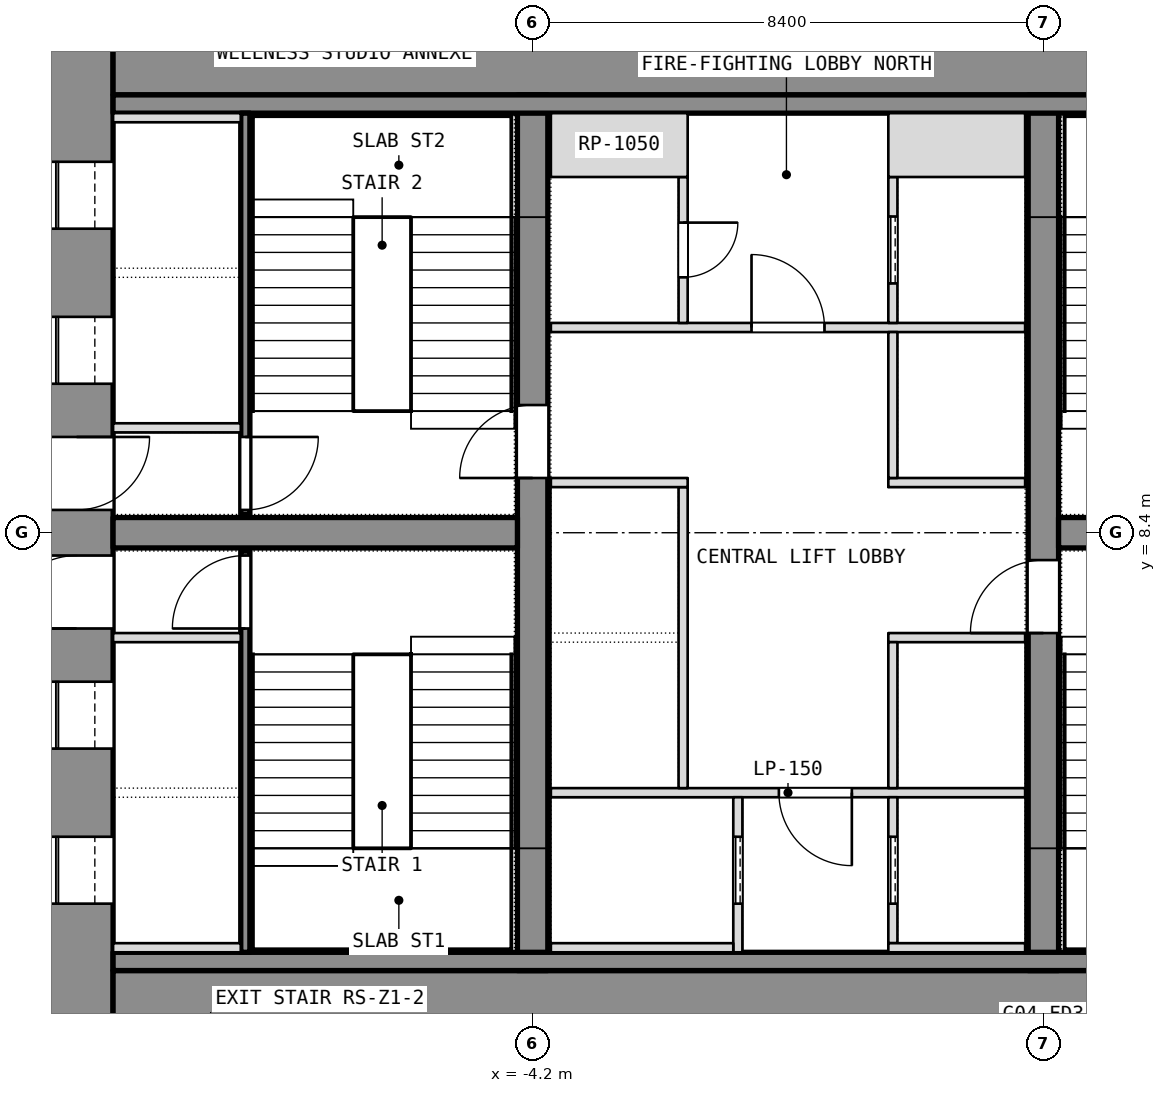
"""IFC4 building model, lengths in metres.
Left out: names, types, materials, properties, quantities, classifications, styles, units other than length and angle.
Written with IfcOpenShell. Run it as: python <this file> out.ifc"""

import sys

from ifc_helpers import new_model, si_unit, direction, frame, frame_2d, origin, place, context, subcontext, project, spatial, rectangle, extrude, element, fill, save


model = new_model("IFC4")
c1 = context("Model", 3, precision=1e-05, world=origin(), true_north=direction((0.0, 1.0)))
c2 = subcontext(c1, "Body", "Model", "MODEL_VIEW")
j1 = project(units=[si_unit("LENGTHUNIT", "METRE"), si_unit("PLANEANGLEUNIT", "RADIAN")], contexts=[c1])
p1 = place(None, origin())
s1 = spatial("IfcSite", under=j1, at=p1, CompositionType="ELEMENT")
p2 = place(p1, origin())
s2 = spatial("IfcBuilding", under=s1, at=p2, CompositionType="ELEMENT")
p3 = place(p2, frame((0.0, 0.0, 61.7)))
s3 = spatial("IfcBuildingStorey", under=s2, at=p3, CompositionType="ELEMENT", Elevation=61.7)
p4 = place(p3, frame((-11.7, 0.0, 0.0), z_axis=(0.0, 0.0, 1.0), x_axis=(0.0, 1.0, 0.0)))
e1 = element("IfcWall", 1, at=p4, inside=s3, PredefinedType="SHEAR", context=c2, shape_type="SweptSolid", body=[
    extrude(rectangle(XDim=16.8, YDim=1.2, at=frame_2d((8.4, 0.0))), origin(), (0.0, 0.0, 1.0), 3.6),
])
p5 = place(p4, frame((2.3, 0.0, 0.0)))
e2 = element("IfcOpeningElement", 2, at=p5, cuts=e1, PredefinedType="OPENING", context=c2, shape_type="SweptSolid", body=[
    extrude(rectangle(XDim=1.1, YDim=2.1, at=frame_2d((0.55, 1.05))), frame((0.0, 0.6, 0.0), z_axis=(0.0, -1.0, 0.0), x_axis=(1.0, 0.0, 0.0)), (0.0, 0.0, 1.0), 1.2),
])
p6 = place(p4, frame((4.85, 0.0, 0.0)))
e3 = element("IfcOpeningElement", 3, at=p6, cuts=e1, PredefinedType="OPENING", context=c2, shape_type="SweptSolid", body=[
    extrude(rectangle(XDim=1.1, YDim=2.1, at=frame_2d((0.55, 1.05))), frame((0.0, 0.6, 0.0), z_axis=(0.0, -1.0, 0.0), x_axis=(1.0, 0.0, 0.0)), (0.0, 0.0, 1.0), 1.2),
])
p7 = place(p4, frame((6.825, 0.0, 0.0)))
e4 = element("IfcOpeningElement", 4, at=p7, cuts=e1, PredefinedType="OPENING", context=c2, shape_type="SweptSolid", body=[
    extrude(rectangle(XDim=1.2, YDim=2.1, at=frame_2d((0.6, 1.05))), frame((0.0, 0.6, 0.0), z_axis=(0.0, -1.0, 0.0), x_axis=(1.0, 0.0, 0.0)), (0.0, 0.0, 1.0), 1.2),
])
p8 = place(p4, frame((13.4, 0.0, 0.0)))
e5 = element("IfcOpeningElement", 5, at=p8, cuts=e1, PredefinedType="OPENING", context=c2, shape_type="SweptSolid", body=[
    extrude(rectangle(XDim=1.1, YDim=2.1, at=frame_2d((0.55, 1.05))), frame((0.0, 0.6, 0.0), z_axis=(0.0, -1.0, 0.0), x_axis=(1.0, 0.0, 0.0)), (0.0, 0.0, 1.0), 1.2),
])
p9 = place(p4, frame((10.85, 0.0, 0.0)))
e6 = element("IfcOpeningElement", 6, at=p9, cuts=e1, PredefinedType="OPENING", context=c2, shape_type="SweptSolid", body=[
    extrude(rectangle(XDim=1.1, YDim=2.1, at=frame_2d((0.55, 1.05))), frame((0.0, 0.6, 0.0), z_axis=(0.0, -1.0, 0.0), x_axis=(1.0, 0.0, 0.0)), (0.0, 0.0, 1.0), 1.2),
])
p10 = place(p4, frame((8.775, 0.0, 0.0)))
e7 = element("IfcOpeningElement", 7, at=p10, cuts=e1, PredefinedType="OPENING", context=c2, shape_type="SweptSolid", body=[
    extrude(rectangle(XDim=1.2, YDim=2.1, at=frame_2d((0.6, 1.05))), frame((0.0, 0.6, 0.0), z_axis=(0.0, -1.0, 0.0), x_axis=(1.0, 0.0, 0.0)), (0.0, 0.0, 1.0), 1.2),
])
for number, where, z_axis, x_axis in (
    (8, (-11.1, 0.6, 0.0), (0.0, 0.0, 1.0), (1.0, 0.0, 0.0)),
    (9, (-11.1, 16.2, 0.0), (0.0, 0.0, 1.0), (1.0, 0.0, 0.0)),
):
    element("IfcWall", number, at=place(p3, frame(where, z_axis=z_axis, x_axis=x_axis)), inside=s3, PredefinedType="SHEAR", context=c2, shape_type="SweptSolid", body=[
        extrude(rectangle(XDim=22.2, YDim=1.2, at=frame_2d((11.1, 0.0))), origin(), (0.0, 0.0, 1.0), 3.6),
    ])
p11 = place(p3, frame((-4.2, 1.2, 0.0), z_axis=(0.0, 0.0, 1.0), x_axis=(0.0, 1.0, 0.0)))
e10 = element("IfcWall", 10, at=p11, inside=s3, PredefinedType="SHEAR", context=c2, shape_type="SweptSolid", body=[
    extrude(rectangle(XDim=14.4, YDim=0.5, at=frame_2d((7.2, 0.0))), origin(), (0.0, 0.0, 1.0), 3.6),
])
p12 = place(p11, frame((8.1, 0.0, 0.0)))
e11 = element("IfcOpeningElement", 11, at=p12, cuts=e10, PredefinedType="OPENING", context=c2, shape_type="SweptSolid", body=[
    extrude(rectangle(XDim=1.2, YDim=2.1, at=frame_2d((0.6, 1.05))), frame((0.0, 0.25, 0.0), z_axis=(0.0, -1.0, 0.0), x_axis=(1.0, 0.0, 0.0)), (0.0, 0.0, 1.0), 0.5),
])
p13 = place(p3, frame((4.2, 1.2, 0.0), z_axis=(0.0, 0.0, 1.0), x_axis=(0.0, 1.0, 0.0)))
e12 = element("IfcWall", 12, at=p13, inside=s3, PredefinedType="SHEAR", context=c2, shape_type="SweptSolid", body=[
    extrude(rectangle(XDim=14.4, YDim=0.5, at=frame_2d((7.2, 0.0))), origin(), (0.0, 0.0, 1.0), 3.6),
])
p14 = place(p13, frame((5.55, 0.0, 0.0)))
e13 = element("IfcOpeningElement", 13, at=p14, cuts=e12, PredefinedType="OPENING", context=c2, shape_type="SweptSolid", body=[
    extrude(rectangle(XDim=1.2, YDim=2.1, at=frame_2d((0.6, 1.05))), frame((0.0, 0.25, 0.0), z_axis=(0.0, -1.0, 0.0), x_axis=(1.0, 0.0, 0.0)), (0.0, 0.0, 1.0), 0.5),
])
for number, where, z_axis, x_axis in (
    (14, (-11.1, 8.4, 0.0), (0.0, 0.0, 1.0), (1.0, 0.0, 0.0)),
    (15, (4.45, 8.4, 0.0), (0.0, 0.0, 1.0), (1.0, 0.0, 0.0)),
):
    element("IfcWall", number, at=place(p3, frame(where, z_axis=z_axis, x_axis=x_axis)), inside=s3, PredefinedType="SHEAR", context=c2, shape_type="SweptSolid", body=[
        extrude(rectangle(XDim=6.65, YDim=0.5, at=frame_2d((3.325, 0.0))), origin(), (0.0, 0.0, 1.0), 3.6),
    ])
for number, where, z_axis, x_axis in (
    (16, (-11.1, 1.35, 0.0), (0.0, 0.0, 1.0), (1.0, 0.0, 0.0)),
    (17, (-11.1, 15.45, 0.0), (0.0, 0.0, 1.0), (1.0, 0.0, 0.0)),
):
    element("IfcWall", number, at=place(p3, frame(where, z_axis=z_axis, x_axis=x_axis)), inside=s3, PredefinedType="PARTITIONING", context=c2, shape_type="SweptSolid", body=[
        extrude(rectangle(XDim=22.2, YDim=0.3, at=frame_2d((11.1, 0.0))), origin(), (0.0, 0.0, 1.0), 3.34),
    ])
p15 = place(p3, frame((-8.925, 1.5, 0.0), z_axis=(0.0, 0.0, 1.0), x_axis=(0.0, 1.0, 0.0)))
e18 = element("IfcWall", 18, at=p15, inside=s3, PredefinedType="SHEAR", context=c2, shape_type="SweptSolid", body=[
    extrude(rectangle(XDim=6.6, YDim=0.15, at=frame_2d((3.3, 0.0))), origin(), (0.0, 0.0, 1.0), 3.34),
])
p16 = place(p15, frame((5.325, 0.0, 0.0)))
e19 = element("IfcOpeningElement", 19, at=p16, cuts=e18, PredefinedType="OPENING", context=c2, shape_type="SweptSolid", body=[
    extrude(rectangle(XDim=1.2, YDim=2.1, at=frame_2d((0.6, 1.05))), frame((0.0, 0.075, 0.0), z_axis=(0.0, -1.0, 0.0), x_axis=(1.0, 0.0, 0.0)), (0.0, 0.0, 1.0), 0.15),
])
for number, where, z_axis, x_axis in (
    (20, (-11.1, 6.675, 0.0), (0.0, 0.0, 1.0), (1.0, 0.0, 0.0)),
    (21, (-11.1, 1.575, 0.0), (0.0, 0.0, 1.0), (1.0, 0.0, 0.0)),
):
    element("IfcWall", number, at=place(p3, frame(where, z_axis=z_axis, x_axis=x_axis)), inside=s3, PredefinedType="SHEAR", context=c2, shape_type="SweptSolid", body=[
        extrude(rectangle(XDim=2.1, YDim=0.15, at=frame_2d((1.05, 0.0))), origin(), (0.0, 0.0, 1.0), 3.6),
    ])
p17 = place(p3, frame((-8.925, 8.7, 0.0), z_axis=(0.0, 0.0, 1.0), x_axis=(0.0, 1.0, 0.0)))
e22 = element("IfcWall", 22, at=p17, inside=s3, PredefinedType="SHEAR", context=c2, shape_type="SweptSolid", body=[
    extrude(rectangle(XDim=6.6, YDim=0.15, at=frame_2d((3.3, 0.0))), origin(), (0.0, 0.0, 1.0), 3.34),
])
p18 = place(p17, frame((0.075, 0.0, 0.0)))
e23 = element("IfcOpeningElement", 23, at=p18, cuts=e22, PredefinedType="OPENING", context=c2, shape_type="SweptSolid", body=[
    extrude(rectangle(XDim=1.2, YDim=2.1, at=frame_2d((0.6, 1.05))), frame((0.0, 0.075, 0.0), z_axis=(0.0, -1.0, 0.0), x_axis=(1.0, 0.0, 0.0)), (0.0, 0.0, 1.0), 0.15),
])
for number, where, z_axis, x_axis in (
    (24, (-11.1, 10.125, 0.0), (0.0, 0.0, 1.0), (1.0, 0.0, 0.0)),
    (25, (-11.1, 15.225, 0.0), (0.0, 0.0, 1.0), (1.0, 0.0, 0.0)),
):
    element("IfcWall", number, at=place(p3, frame(where, z_axis=z_axis, x_axis=x_axis)), inside=s3, PredefinedType="SHEAR", context=c2, shape_type="SweptSolid", body=[
        extrude(rectangle(XDim=2.1, YDim=0.15, at=frame_2d((1.05, 0.0))), origin(), (0.0, 0.0, 1.0), 3.6),
    ])
p19 = place(p3, frame((-3.9, 4.125, 0.0), z_axis=(0.0, 0.0, 1.0), x_axis=(1.0, 0.0, 0.0)))
e26 = element("IfcWall", 26, at=p19, inside=s3, PredefinedType="PARTITIONING", context=c2, shape_type="SweptSolid", body=[
    extrude(rectangle(XDim=7.8, YDim=0.15, at=frame_2d((3.9, 0.0))), origin(), (0.0, 0.0, 1.0), 3.34),
])
p20 = place(p19, frame((3.75, 0.0, 0.0)))
e27 = element("IfcOpeningElement", 27, at=p20, cuts=e26, PredefinedType="OPENING", context=c2, shape_type="SweptSolid", body=[
    extrude(rectangle(XDim=1.2, YDim=2.1, at=frame_2d((0.6, 1.05))), frame((0.0, 0.075, 0.0), z_axis=(0.0, -1.0, 0.0), x_axis=(1.0, 0.0, 0.0)), (0.0, 0.0, 1.0), 0.15),
])
p21 = place(p3, frame((-3.9, 11.775, 0.0), z_axis=(0.0, 0.0, 1.0), x_axis=(1.0, 0.0, 0.0)))
e28 = element("IfcWall", 28, at=p21, inside=s3, PredefinedType="PARTITIONING", context=c2, shape_type="SweptSolid", body=[
    extrude(rectangle(XDim=7.8, YDim=0.15, at=frame_2d((3.9, 0.0))), origin(), (0.0, 0.0, 1.0), 3.34),
])
p22 = place(p21, frame((3.3, 0.0, 0.0)))
e29 = element("IfcOpeningElement", 29, at=p22, cuts=e28, PredefinedType="OPENING", context=c2, shape_type="SweptSolid", body=[
    extrude(rectangle(XDim=1.2, YDim=2.1, at=frame_2d((0.6, 1.05))), frame((0.0, 0.075, 0.0), z_axis=(0.0, -1.0, 0.0), x_axis=(1.0, 0.0, 0.0)), (0.0, 0.0, 1.0), 0.15),
])
p23 = place(p3, frame((-0.825, 1.5, 0.0), z_axis=(0.0, 0.0, 1.0), x_axis=(0.0, 1.0, 0.0)))
e30 = element("IfcWall", 30, at=p23, inside=s3, PredefinedType="SHEAR", context=c2, shape_type="SweptSolid", body=[
    extrude(rectangle(XDim=2.55, YDim=0.15, at=frame_2d((1.275, 0.0))), origin(), (0.0, 0.0, 1.0), 3.6),
])
p24 = place(p23, frame((0.8, 0.0, 0.0)))
e31 = element("IfcOpeningElement", 31, at=p24, cuts=e30, PredefinedType="OPENING", context=c2, shape_type="SweptSolid", body=[
    extrude(rectangle(XDim=1.1, YDim=2.1, at=frame_2d((0.55, 1.05))), frame((0.0, 0.075, 0.0), z_axis=(0.0, -1.0, 0.0), x_axis=(1.0, 0.0, 0.0)), (0.0, 0.0, 1.0), 0.15),
])
p25 = place(p3, frame((-3.9, 1.575, 0.0), z_axis=(0.0, 0.0, 1.0), x_axis=(1.0, 0.0, 0.0)))
e32 = element("IfcWall", 32, at=p25, inside=s3, PredefinedType="SHEAR", context=c2, shape_type="SweptSolid", body=[
    extrude(rectangle(XDim=3.0, YDim=0.15, at=frame_2d((1.5, 0.0))), origin(), (0.0, 0.0, 1.0), 3.6),
])
p26 = place(p3, frame((-1.725, 4.2, 0.0), z_axis=(0.0, 0.0, 1.0), x_axis=(0.0, 1.0, 0.0)))
e33 = element("IfcWall", 33, at=p26, inside=s3, PredefinedType="SHEAR", context=c2, shape_type="SweptSolid", body=[
    extrude(rectangle(XDim=4.95, YDim=0.15, at=frame_2d((2.475, 0.0))), origin(), (0.0, 0.0, 1.0), 3.6),
])
p27 = place(p3, frame((-3.9, 9.225, 0.0), z_axis=(0.0, 0.0, 1.0), x_axis=(1.0, 0.0, 0.0)))
e34 = element("IfcWall", 34, at=p27, inside=s3, PredefinedType="SHEAR", context=c2, shape_type="SweptSolid", body=[
    extrude(rectangle(XDim=2.25, YDim=0.15, at=frame_2d((1.125, 0.0))), origin(), (0.0, 0.0, 1.0), 3.6),
])
p28 = place(p3, frame((-1.725, 11.85, 0.0), z_axis=(0.0, 0.0, 1.0), x_axis=(0.0, 1.0, 0.0)))
e35 = element("IfcWall", 35, at=p28, inside=s3, PredefinedType="PARTITIONING", context=c2, shape_type="SweptSolid", body=[
    extrude(rectangle(XDim=2.4, YDim=0.15, at=frame_2d((1.2, 0.0))), origin(), (0.0, 0.0, 1.0), 3.34),
])
p29 = place(p28, frame((0.75, 0.0, 0.0)))
e36 = element("IfcOpeningElement", 36, at=p29, cuts=e35, PredefinedType="OPENING", context=c2, shape_type="SweptSolid", body=[
    extrude(rectangle(XDim=0.9, YDim=2.1, at=frame_2d((0.45, 1.05))), frame((0.0, 0.075, 0.0), z_axis=(0.0, -1.0, 0.0), x_axis=(1.0, 0.0, 0.0)), (0.0, 0.0, 1.0), 0.15),
])
p30 = place(p3, frame((-3.9, 14.775, 0.0), z_axis=(0.0, 0.0, 1.0), x_axis=(1.0, 0.0, 0.0)))
e37 = element("IfcWall", 37, at=p30, inside=s3, PredefinedType="PARTITIONING", context=c2, shape_type="SweptSolid", body=[
    extrude(rectangle(XDim=2.25, YDim=1.05, at=frame_2d((1.125, 0.0))), origin(), (0.0, 0.0, 1.0), 3.34),
])
p31 = place(p3, frame((1.725, 1.65, 0.0), z_axis=(0.0, 0.0, 1.0), x_axis=(0.0, 1.0, 0.0)))
e38 = element("IfcWall", 38, at=p31, inside=s3, PredefinedType="SHEAR", context=c2, shape_type="SweptSolid", body=[
    extrude(rectangle(XDim=2.4, YDim=0.15, at=frame_2d((1.2, 0.0))), origin(), (0.0, 0.0, 1.0), 3.6),
])
p32 = place(p31, frame((0.65, 0.0, 0.0)))
e39 = element("IfcOpeningElement", 39, at=p32, cuts=e38, PredefinedType="OPENING", context=c2, shape_type="SweptSolid", body=[
    extrude(rectangle(XDim=1.1, YDim=2.1, at=frame_2d((0.55, 1.05))), frame((0.0, 0.075, 0.0), z_axis=(0.0, -1.0, 0.0), x_axis=(1.0, 0.0, 0.0)), (0.0, 0.0, 1.0), 0.15),
])
p33 = place(p3, frame((1.65, 1.575, 0.0), z_axis=(0.0, 0.0, 1.0), x_axis=(1.0, 0.0, 0.0)))
e40 = element("IfcWall", 40, at=p33, inside=s3, PredefinedType="SHEAR", context=c2, shape_type="SweptSolid", body=[
    extrude(rectangle(XDim=2.25, YDim=0.15, at=frame_2d((1.125, 0.0))), origin(), (0.0, 0.0, 1.0), 3.6),
])
p34 = place(p3, frame((1.725, 11.85, 0.0), z_axis=(0.0, 0.0, 1.0), x_axis=(0.0, 1.0, 0.0)))
e41 = element("IfcWall", 41, at=p34, inside=s3, PredefinedType="SHEAR", context=c2, shape_type="SweptSolid", body=[
    extrude(rectangle(XDim=2.4, YDim=0.15, at=frame_2d((1.2, 0.0))), origin(), (0.0, 0.0, 1.0), 3.6),
])
p35 = place(p34, frame((0.65, 0.0, 0.0)))
e42 = element("IfcOpeningElement", 42, at=p35, cuts=e41, PredefinedType="OPENING", context=c2, shape_type="SweptSolid", body=[
    extrude(rectangle(XDim=1.1, YDim=2.1, at=frame_2d((0.55, 1.05))), frame((0.0, 0.075, 0.0), z_axis=(0.0, -1.0, 0.0), x_axis=(1.0, 0.0, 0.0)), (0.0, 0.0, 1.0), 0.15),
])
p36 = place(p3, frame((1.65, 14.775, 0.0), z_axis=(0.0, 0.0, 1.0), x_axis=(1.0, 0.0, 0.0)))
e43 = element("IfcWall", 43, at=p36, inside=s3, PredefinedType="SHEAR", context=c2, shape_type="SweptSolid", body=[
    extrude(rectangle(XDim=2.25, YDim=1.05, at=frame_2d((1.125, 0.0))), origin(), (0.0, 0.0, 1.0), 3.6),
])
for number, where, z_axis, x_axis in (
    (44, (1.65, 6.675, 0.0), (0.0, 0.0, 1.0), (1.0, 0.0, 0.0)),
    (45, (1.65, 9.225, 0.0), (0.0, 0.0, 1.0), (1.0, 0.0, 0.0)),
):
    element("IfcWall", number, at=place(p3, frame(where, z_axis=z_axis, x_axis=x_axis)), inside=s3, PredefinedType="SHEAR", context=c2, shape_type="SweptSolid", body=[
        extrude(rectangle(XDim=2.25, YDim=0.15, at=frame_2d((1.125, 0.0))), origin(), (0.0, 0.0, 1.0), 3.6),
    ])
p37 = place(p3, frame((1.725, 4.2, 0.0), z_axis=(0.0, 0.0, 1.0), x_axis=(0.0, 1.0, 0.0)))
e46 = element("IfcWall", 46, at=p37, inside=s3, PredefinedType="SHEAR", context=c2, shape_type="SweptSolid", body=[
    extrude(rectangle(XDim=2.4, YDim=0.15, at=frame_2d((1.2, 0.0))), origin(), (0.0, 0.0, 1.0), 3.6),
])
p38 = place(p3, frame((1.725, 9.3, 0.0), z_axis=(0.0, 0.0, 1.0), x_axis=(0.0, 1.0, 0.0)))
e47 = element("IfcWall", 47, at=p38, inside=s3, PredefinedType="SHEAR", context=c2, shape_type="SweptSolid", body=[
    extrude(rectangle(XDim=2.4, YDim=0.15, at=frame_2d((1.2, 0.0))), origin(), (0.0, 0.0, 1.0), 3.6),
])
p39 = place(p5, origin())
e48 = element("IfcDoor", 48, at=p39, inside=s3, OperationType="SLIDING_TO_LEFT", PredefinedType="DOOR", context=c2, shape_type="SweptSolid", body=[
    extrude(rectangle(XDim=1.1, YDim=2.1, at=frame_2d((0.55, 1.05))), frame((0.0, 0.025, 0.0), z_axis=(0.0, -1.0, 0.0), x_axis=(1.0, 0.0, 0.0)), (0.0, 0.0, 1.0), 0.05),
])
fill(e2, e48)
p40 = place(p6, origin())
e49 = element("IfcDoor", 49, at=p40, inside=s3, OperationType="SLIDING_TO_LEFT", PredefinedType="DOOR", context=c2, shape_type="SweptSolid", body=[
    extrude(rectangle(XDim=1.1, YDim=2.1, at=frame_2d((0.55, 1.05))), frame((0.0, 0.025, 0.0), z_axis=(0.0, -1.0, 0.0), x_axis=(1.0, 0.0, 0.0)), (0.0, 0.0, 1.0), 0.05),
])
fill(e3, e49)
p41 = place(p7, origin())
e50 = element("IfcDoor", 50, at=p41, inside=s3, OperationType="SINGLE_SWING_LEFT", PredefinedType="DOOR", context=c2, shape_type="SweptSolid", body=[
    extrude(rectangle(XDim=1.2, YDim=2.1, at=frame_2d((0.6, 1.05))), frame((0.0, 0.025, 0.0), z_axis=(0.0, -1.0, 0.0), x_axis=(1.0, 0.0, 0.0)), (0.0, 0.0, 1.0), 0.05),
])
fill(e4, e50)
p42 = place(p16, origin())
e51 = element("IfcDoor", 51, at=p42, inside=s3, OperationType="SINGLE_SWING_LEFT", PredefinedType="DOOR", context=c2, shape_type="SweptSolid", body=[
    extrude(rectangle(XDim=1.2, YDim=2.1, at=frame_2d((0.6, 1.05))), frame((0.0, 0.025, 0.0), z_axis=(0.0, -1.0, 0.0), x_axis=(1.0, 0.0, 0.0)), (0.0, 0.0, 1.0), 0.05),
])
fill(e19, e51)
p43 = place(p8, origin())
e52 = element("IfcDoor", 52, at=p43, inside=s3, OperationType="SLIDING_TO_LEFT", PredefinedType="DOOR", context=c2, shape_type="SweptSolid", body=[
    extrude(rectangle(XDim=1.1, YDim=2.1, at=frame_2d((0.55, 1.05))), frame((0.0, 0.025, 0.0), z_axis=(0.0, -1.0, 0.0), x_axis=(1.0, 0.0, 0.0)), (0.0, 0.0, 1.0), 0.05),
])
fill(e5, e52)
p44 = place(p9, origin())
e53 = element("IfcDoor", 53, at=p44, inside=s3, OperationType="SLIDING_TO_LEFT", PredefinedType="DOOR", context=c2, shape_type="SweptSolid", body=[
    extrude(rectangle(XDim=1.1, YDim=2.1, at=frame_2d((0.55, 1.05))), frame((0.0, 0.025, 0.0), z_axis=(0.0, -1.0, 0.0), x_axis=(1.0, 0.0, 0.0)), (0.0, 0.0, 1.0), 0.05),
])
fill(e6, e53)
p45 = place(p10, origin())
e54 = element("IfcDoor", 54, at=p45, inside=s3, OperationType="SINGLE_SWING_LEFT", PredefinedType="DOOR", context=c2, shape_type="SweptSolid", body=[
    extrude(rectangle(XDim=1.2, YDim=2.1, at=frame_2d((0.6, 1.05))), frame((0.0, 0.025, 0.0), z_axis=(0.0, -1.0, 0.0), x_axis=(1.0, 0.0, 0.0)), (0.0, 0.0, 1.0), 0.05),
])
fill(e7, e54)
p46 = place(p18, origin())
e55 = element("IfcDoor", 55, at=p46, inside=s3, OperationType="SINGLE_SWING_LEFT", PredefinedType="DOOR", context=c2, shape_type="SweptSolid", body=[
    extrude(rectangle(XDim=1.2, YDim=2.1, at=frame_2d((0.6, 1.05))), frame((0.0, 0.025, 0.0), z_axis=(0.0, -1.0, 0.0), x_axis=(1.0, 0.0, 0.0)), (0.0, 0.0, 1.0), 0.05),
])
fill(e23, e55)
p47 = place(p24, origin())
e56 = element("IfcDoor", 56, at=p47, inside=s3, OperationType="SLIDING_TO_LEFT", PredefinedType="DOOR", context=c2, shape_type="SweptSolid", body=[
    extrude(rectangle(XDim=1.1, YDim=2.1, at=frame_2d((0.55, 1.05))), frame((0.0, 0.025, 0.0), z_axis=(0.0, -1.0, 0.0), x_axis=(1.0, 0.0, 0.0)), (0.0, 0.0, 1.0), 0.05),
])
fill(e31, e56)
p48 = place(p32, origin())
e57 = element("IfcDoor", 57, at=p48, inside=s3, OperationType="SLIDING_TO_LEFT", PredefinedType="DOOR", context=c2, shape_type="SweptSolid", body=[
    extrude(rectangle(XDim=1.1, YDim=2.1, at=frame_2d((0.55, 1.05))), frame((0.0, 0.025, 0.0), z_axis=(0.0, -1.0, 0.0), x_axis=(1.0, 0.0, 0.0)), (0.0, 0.0, 1.0), 0.05),
])
fill(e39, e57)
p49 = place(p35, origin())
e58 = element("IfcDoor", 58, at=p49, inside=s3, OperationType="SLIDING_TO_LEFT", PredefinedType="DOOR", context=c2, shape_type="SweptSolid", body=[
    extrude(rectangle(XDim=1.1, YDim=2.1, at=frame_2d((0.55, 1.05))), frame((0.0, 0.025, 0.0), z_axis=(0.0, -1.0, 0.0), x_axis=(1.0, 0.0, 0.0)), (0.0, 0.0, 1.0), 0.05),
])
fill(e42, e58)
p50 = place(p20, origin())
e59 = element("IfcDoor", 59, at=p50, inside=s3, OperationType="SINGLE_SWING_LEFT", PredefinedType="DOOR", context=c2, shape_type="SweptSolid", body=[
    extrude(rectangle(XDim=1.2, YDim=2.1, at=frame_2d((0.6, 1.05))), frame((0.0, 0.025, 0.0), z_axis=(0.0, -1.0, 0.0), x_axis=(1.0, 0.0, 0.0)), (0.0, 0.0, 1.0), 0.05),
])
fill(e27, e59)
p51 = place(p22, origin())
e60 = element("IfcDoor", 60, at=p51, inside=s3, OperationType="SINGLE_SWING_LEFT", PredefinedType="DOOR", context=c2, shape_type="SweptSolid", body=[
    extrude(rectangle(XDim=1.2, YDim=2.1, at=frame_2d((0.6, 1.05))), frame((0.0, 0.025, 0.0), z_axis=(0.0, -1.0, 0.0), x_axis=(1.0, 0.0, 0.0)), (0.0, 0.0, 1.0), 0.05),
])
fill(e29, e60)
p52 = place(p29, origin())
e61 = element("IfcDoor", 61, at=p52, inside=s3, OperationType="SINGLE_SWING_LEFT", PredefinedType="DOOR", context=c2, shape_type="SweptSolid", body=[
    extrude(rectangle(XDim=0.9, YDim=2.1, at=frame_2d((0.45, 1.05))), frame((0.0, 0.025, 0.0), z_axis=(0.0, -1.0, 0.0), x_axis=(1.0, 0.0, 0.0)), (0.0, 0.0, 1.0), 0.05),
])
fill(e36, e61)
p53 = place(p12, origin())
e62 = element("IfcDoor", 62, at=p53, inside=s3, OperationType="SINGLE_SWING_LEFT", PredefinedType="DOOR", context=c2, shape_type="SweptSolid", body=[
    extrude(rectangle(XDim=1.2, YDim=2.1, at=frame_2d((0.6, 1.05))), frame((0.0, 0.025, 0.0), z_axis=(0.0, -1.0, 0.0), x_axis=(1.0, 0.0, 0.0)), (0.0, 0.0, 1.0), 0.05),
])
fill(e11, e62)
p54 = place(p14, origin())
e63 = element("IfcDoor", 63, at=p54, inside=s3, OperationType="SINGLE_SWING_LEFT", PredefinedType="DOOR", context=c2, shape_type="SweptSolid", body=[
    extrude(rectangle(XDim=1.2, YDim=2.1, at=frame_2d((0.6, 1.05))), frame((0.0, 0.025, 0.0), z_axis=(0.0, -1.0, 0.0), x_axis=(1.0, 0.0, 0.0)), (0.0, 0.0, 1.0), 0.05),
])
fill(e13, e63)
save(model, sys.argv[1])
